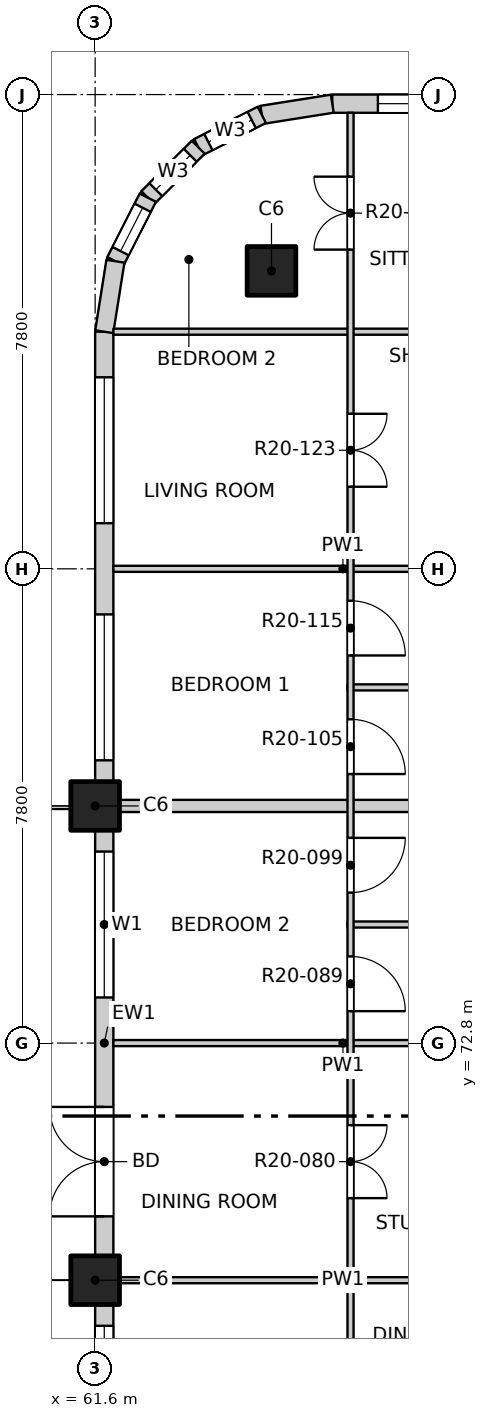
"""IFC4 building model, lengths in metres.
Left out: names, types, materials, properties, quantities, classifications, styles, units other than length and angle.
Written with IfcOpenShell. Run it as: python <this file> out.ifc"""

import sys

from ifc_helpers import new_model, si_unit, direction, frame, frame_2d, origin, origin_2d, place, context, subcontext, project, spatial, rectangle, extrude, element, fill, save


model = new_model("IFC4")
c1 = context("Model", 3, precision=1e-05, world=origin(), true_north=direction((0.0, 1.0)))
c2 = subcontext(c1, "Body", "Model", "MODEL_VIEW")
j1 = project(units=[si_unit("LENGTHUNIT", "METRE"), si_unit("PLANEANGLEUNIT", "RADIAN")], contexts=[c1])
p1 = place(None, origin())
s1 = spatial("IfcSite", under=j1, at=p1, CompositionType="ELEMENT")
p2 = place(p1, origin())
s2 = spatial("IfcBuilding", under=s1, at=p2, CompositionType="ELEMENT")
p3 = place(p2, frame((0.0, 0.0, 210.9)))
s3 = spatial("IfcBuildingStorey", under=s2, at=p3, CompositionType="ELEMENT", Elevation=210.9)
for number, where, z_axis, x_axis in (
    (1, (64.5, 85.5, -0.25), (0.0, 0.0, 1.0), (1.0, 0.0, 0.0)),
    (2, (61.6, 68.9, -0.25), (0.0, 0.0, 1.0), (1.0, 0.0, 0.0)),
    (3, (61.6, 76.7, -0.25), (0.0, 0.0, 1.0), (1.0, 0.0, 0.0)),
):
    element("IfcColumn", number, at=place(p3, frame(where, z_axis=z_axis, x_axis=x_axis)), inside=s3, PredefinedType="COLUMN", context=c2, shape_type="SweptSolid", body=[
        extrude(rectangle(XDim=0.8, YDim=0.8, at=origin_2d()), origin(), (0.0, 0.0, 1.0), 3.4),
    ])
p4 = place(p3, frame((65.5, 88.25, 0.0), z_axis=(0.0, 0.0, 1.0), x_axis=(1.0, 0.0, 0.0)))
e4 = element("IfcWall", 4, at=p4, inside=s3, PredefinedType="SOLIDWALL", context=c2, shape_type="SweptSolid", body=[
    extrude(rectangle(XDim=7.4, YDim=0.3, at=frame_2d((3.7, 0.0))), origin(), (0.0, 0.0, 1.0), 2.7),
])
p5 = place(p4, frame((0.75, 0.0, 0.9)))
e5 = element("IfcOpeningElement", 5, at=p5, cuts=e4, PredefinedType="OPENING", context=c2, shape_type="SweptSolid", body=[
    extrude(rectangle(XDim=2.4, YDim=1.8, at=frame_2d((1.2, 0.9))), frame((0.0, 0.16, 0.0), z_axis=(0.0, -1.0, 0.0), x_axis=(1.0, 0.0, 0.0)), (0.0, 0.0, 1.0), 0.32),
])
p6 = place(p4, frame((4.65, 0.0, 0.9)))
e6 = element("IfcOpeningElement", 6, at=p6, cuts=e4, PredefinedType="OPENING", context=c2, shape_type="SweptSolid", body=[
    extrude(rectangle(XDim=2.4, YDim=1.8, at=frame_2d((1.2, 0.9))), frame((0.0, 0.16, 0.0), z_axis=(0.0, -1.0, 0.0), x_axis=(1.0, 0.0, 0.0)), (0.0, 0.0, 1.0), 0.32),
])
p7 = place(p3, frame((61.75, 61.5, 0.0), z_axis=(0.0, 0.0, 1.0), x_axis=(0.0, 1.0, 0.0)))
e7 = element("IfcWall", 7, at=p7, inside=s3, PredefinedType="SOLIDWALL", context=c2, shape_type="SweptSolid", body=[
    extrude(rectangle(XDim=7.0, YDim=0.3, at=frame_2d((3.5, 0.0))), origin(), (0.0, 0.0, 1.0), 2.7),
])
p8 = place(p7, frame((0.65, 0.0, 0.0)))
e8 = element("IfcOpeningElement", 8, at=p8, cuts=e7, PredefinedType="OPENING", context=c2, shape_type="SweptSolid", body=[
    extrude(rectangle(XDim=1.8, YDim=2.4, at=frame_2d((0.9, 1.2))), frame((0.0, 0.16, 0.0), z_axis=(0.0, -1.0, 0.0), x_axis=(1.0, 0.0, 0.0)), (0.0, 0.0, 1.0), 0.32),
])
p9 = place(p7, frame((4.25, 0.0, 0.9)))
e9 = element("IfcOpeningElement", 9, at=p9, cuts=e7, PredefinedType="OPENING", context=c2, shape_type="SweptSolid", body=[
    extrude(rectangle(XDim=2.4, YDim=1.8, at=frame_2d((1.2, 0.9))), frame((0.0, 0.16, 0.0), z_axis=(0.0, -1.0, 0.0), x_axis=(1.0, 0.0, 0.0)), (0.0, 0.0, 1.0), 0.32),
])
p10 = place(p3, frame((61.75, 69.3, 0.0), z_axis=(0.0, 0.0, 1.0), x_axis=(0.0, 1.0, 0.0)))
e10 = element("IfcWall", 10, at=p10, inside=s3, PredefinedType="SOLIDWALL", context=c2, shape_type="SweptSolid", body=[
    extrude(rectangle(XDim=7.0, YDim=0.3, at=frame_2d((3.5, 0.0))), origin(), (0.0, 0.0, 1.0), 2.7),
])
p11 = place(p10, frame((0.65, 0.0, 0.0)))
e11 = element("IfcOpeningElement", 11, at=p11, cuts=e10, PredefinedType="OPENING", context=c2, shape_type="SweptSolid", body=[
    extrude(rectangle(XDim=1.8, YDim=2.4, at=frame_2d((0.9, 1.2))), frame((0.0, 0.16, 0.0), z_axis=(0.0, -1.0, 0.0), x_axis=(1.0, 0.0, 0.0)), (0.0, 0.0, 1.0), 0.32),
])
p12 = place(p10, frame((4.25, 0.0, 0.9)))
e12 = element("IfcOpeningElement", 12, at=p12, cuts=e10, PredefinedType="OPENING", context=c2, shape_type="SweptSolid", body=[
    extrude(rectangle(XDim=2.4, YDim=1.8, at=frame_2d((1.2, 0.9))), frame((0.0, 0.16, 0.0), z_axis=(0.0, -1.0, 0.0), x_axis=(1.0, 0.0, 0.0)), (0.0, 0.0, 1.0), 0.32),
])
p13 = place(p3, frame((61.75, 77.1, 0.0), z_axis=(0.0, 0.0, 1.0), x_axis=(0.0, 1.0, 0.0)))
e13 = element("IfcWall", 13, at=p13, inside=s3, PredefinedType="SOLIDWALL", context=c2, shape_type="SweptSolid", body=[
    extrude(rectangle(XDim=7.4, YDim=0.3, at=frame_2d((3.7, 0.0))), origin(), (0.0, 0.0, 1.0), 2.7),
])
p14 = place(p13, frame((0.35, 0.0, 0.9)))
e14 = element("IfcOpeningElement", 14, at=p14, cuts=e13, PredefinedType="OPENING", context=c2, shape_type="SweptSolid", body=[
    extrude(rectangle(XDim=2.4, YDim=1.8, at=frame_2d((1.2, 0.9))), frame((0.0, 0.16, 0.0), z_axis=(0.0, -1.0, 0.0), x_axis=(1.0, 0.0, 0.0)), (0.0, 0.0, 1.0), 0.32),
])
p15 = place(p13, frame((4.25, 0.0, 0.9)))
e15 = element("IfcOpeningElement", 15, at=p15, cuts=e13, PredefinedType="OPENING", context=c2, shape_type="SweptSolid", body=[
    extrude(rectangle(XDim=2.4, YDim=1.8, at=frame_2d((1.2, 0.9))), frame((0.0, 0.16, 0.0), z_axis=(0.0, -1.0, 0.0), x_axis=(1.0, 0.0, 0.0)), (0.0, 0.0, 1.0), 0.32),
])
p16 = place(p3, frame((65.5, 88.25, 0.0), z_axis=(0.0, 0.0, 1.0), x_axis=(-0.987678452879, -0.156496880861, 0.0)))
e16 = element("IfcWall", 16, at=p16, inside=s3, PredefinedType="SOLIDWALL", context=c2, shape_type="SweptSolid", body=[
    extrude(rectangle(XDim=1.173, YDim=0.3, at=frame_2d((0.586, 0.0))), origin(), (0.0, 0.0, 1.0), 2.7),
])
p17 = place(p3, frame((64.341, 88.066, 0.0), z_axis=(0.0, 0.0, 1.0), x_axis=(-0.890988677504, -0.454025524128, 0.0)))
e17 = element("IfcWall", 17, at=p17, inside=s3, PredefinedType="SOLIDWALL", context=c2, shape_type="SweptSolid", body=[
    extrude(rectangle(XDim=1.173, YDim=0.3, at=frame_2d((0.587, 0.0))), origin(), (0.0, 0.0, 1.0), 2.7),
])
p18 = place(p17, frame((0.187, 0.0, 0.9)))
e18 = element("IfcOpeningElement", 18, at=p18, cuts=e17, PredefinedType="OPENING", context=c2, shape_type="SweptSolid", body=[
    extrude(rectangle(XDim=0.8, YDim=1.2, at=frame_2d((0.4, 0.6))), frame((0.0, 0.16, 0.0), z_axis=(0.0, -1.0, 0.0), x_axis=(1.0, 0.0, 0.0)), (0.0, 0.0, 1.0), 0.32),
])
p19 = place(p3, frame((63.296, 87.534, 0.0), z_axis=(0.0, 0.0, 1.0), x_axis=(-0.707106781187, -0.707106781187, 0.0)))
e19 = element("IfcWall", 19, at=p19, inside=s3, PredefinedType="SOLIDWALL", context=c2, shape_type="SweptSolid", body=[
    extrude(rectangle(XDim=1.173, YDim=0.3, at=frame_2d((0.586, 0.0))), origin(), (0.0, 0.0, 1.0), 2.7),
])
p20 = place(p19, frame((0.187, 0.0, 0.9)))
e20 = element("IfcOpeningElement", 20, at=p20, cuts=e19, PredefinedType="OPENING", context=c2, shape_type="SweptSolid", body=[
    extrude(rectangle(XDim=0.8, YDim=1.2, at=frame_2d((0.4, 0.6))), frame((0.0, 0.16, 0.0), z_axis=(0.0, -1.0, 0.0), x_axis=(1.0, 0.0, 0.0)), (0.0, 0.0, 1.0), 0.32),
])
p21 = place(p3, frame((62.466, 86.704, 0.0), z_axis=(0.0, 0.0, 1.0), x_axis=(-0.454025524128, -0.890988677504, 0.0)))
e21 = element("IfcWall", 21, at=p21, inside=s3, PredefinedType="SOLIDWALL", context=c2, shape_type="SweptSolid", body=[
    extrude(rectangle(XDim=1.173, YDim=0.3, at=frame_2d((0.587, 0.0))), origin(), (0.0, 0.0, 1.0), 2.7),
])
p22 = place(p21, frame((0.187, 0.0, 0.9)))
e22 = element("IfcOpeningElement", 22, at=p22, cuts=e21, PredefinedType="OPENING", context=c2, shape_type="SweptSolid", body=[
    extrude(rectangle(XDim=0.8, YDim=1.2, at=frame_2d((0.4, 0.6))), frame((0.0, 0.16, 0.0), z_axis=(0.0, -1.0, 0.0), x_axis=(1.0, 0.0, 0.0)), (0.0, 0.0, 1.0), 0.32),
])
p23 = place(p3, frame((61.934, 85.659, 0.0), z_axis=(0.0, 0.0, 1.0), x_axis=(-0.156496880861, -0.987678452879, 0.0)))
e23 = element("IfcWall", 23, at=p23, inside=s3, PredefinedType="SOLIDWALL", context=c2, shape_type="SweptSolid", body=[
    extrude(rectangle(XDim=1.173, YDim=0.3, at=frame_2d((0.586, 0.0))), origin(), (0.0, 0.0, 1.0), 2.7),
])
p24 = place(p3, frame((61.9, 68.9, 0.0), z_axis=(0.0, 0.0, 1.0), x_axis=(1.0, 0.0, 0.0)))
e24 = element("IfcWall", 24, at=p24, inside=s3, PredefinedType="PARTITIONING", context=c2, shape_type="SweptSolid", body=[
    extrude(rectangle(XDim=7.55, YDim=0.1, at=frame_2d((3.775, 0.0))), origin(), (0.0, 0.0, 1.0), 2.55),
])
p25 = place(p3, frame((61.9, 72.8, 0.0), z_axis=(0.0, 0.0, 1.0), x_axis=(1.0, 0.0, 0.0)))
e25 = element("IfcWall", 25, at=p25, inside=s3, PredefinedType="PARTITIONING", context=c2, shape_type="SweptSolid", body=[
    extrude(rectangle(XDim=7.55, YDim=0.1, at=frame_2d((3.775, 0.0))), origin(), (0.0, 0.0, 1.0), 3.15),
])
p26 = place(p3, frame((65.75, 74.75, 0.0), z_axis=(0.0, 0.0, 1.0), x_axis=(1.0, 0.0, 0.0)))
e26 = element("IfcWall", 26, at=p26, inside=s3, PredefinedType="PARTITIONING", context=c2, shape_type="SweptSolid", body=[
    extrude(rectangle(XDim=3.7, YDim=0.1, at=frame_2d((1.85, 0.0))), origin(), (0.0, 0.0, 1.0), 3.15),
])
p27 = place(p3, frame((61.9, 76.7, 0.0), z_axis=(0.0, 0.0, 1.0), x_axis=(1.0, 0.0, 0.0)))
e27 = element("IfcWall", 27, at=p27, inside=s3, PredefinedType="PARTITIONING", context=c2, shape_type="SweptSolid", body=[
    extrude(rectangle(XDim=11.5, YDim=0.2, at=frame_2d((5.75, 0.0))), origin(), (0.0, 0.0, 1.0), 2.55),
])
p28 = place(p3, frame((65.75, 78.65, 0.0), z_axis=(0.0, 0.0, 1.0), x_axis=(1.0, 0.0, 0.0)))
e28 = element("IfcWall", 28, at=p28, inside=s3, PredefinedType="PARTITIONING", context=c2, shape_type="SweptSolid", body=[
    extrude(rectangle(XDim=3.7, YDim=0.1, at=frame_2d((1.85, 0.0))), origin(), (0.0, 0.0, 1.0), 3.15),
])
p29 = place(p3, frame((61.9, 80.6, 0.0), z_axis=(0.0, 0.0, 1.0), x_axis=(1.0, 0.0, 0.0)))
e29 = element("IfcWall", 29, at=p29, inside=s3, PredefinedType="PARTITIONING", context=c2, shape_type="SweptSolid", body=[
    extrude(rectangle(XDim=7.55, YDim=0.1, at=frame_2d((3.775, 0.0))), origin(), (0.0, 0.0, 1.0), 3.15),
])
p30 = place(p3, frame((61.9, 84.5, 0.0), z_axis=(0.0, 0.0, 1.0), x_axis=(1.0, 0.0, 0.0)))
e30 = element("IfcWall", 30, at=p30, inside=s3, PredefinedType="PARTITIONING", context=c2, shape_type="SweptSolid", body=[
    extrude(rectangle(XDim=11.5, YDim=0.1, at=frame_2d((5.75, 0.0))), origin(), (0.0, 0.0, 1.0), 3.15),
])
p31 = place(p30, frame((7.965, 0.0, 0.0)))
e31 = element("IfcOpeningElement", 31, at=p31, cuts=e30, PredefinedType="OPENING", context=c2, shape_type="SweptSolid", body=[
    extrude(rectangle(XDim=0.9, YDim=2.1, at=frame_2d((0.45, 1.05))), frame((0.0, 0.06, 0.0), z_axis=(0.0, -1.0, 0.0), x_axis=(1.0, 0.0, 0.0)), (0.0, 0.0, 1.0), 0.12),
])
p32 = place(p3, frame((65.8, 61.2, 0.0), z_axis=(0.0, 0.0, 1.0), x_axis=(0.0, 1.0, 0.0)))
e32 = element("IfcWall", 32, at=p32, inside=s3, PredefinedType="PARTITIONING", context=c2, shape_type="SweptSolid", body=[
    extrude(rectangle(XDim=26.9, YDim=0.1, at=frame_2d((13.45, 0.0))), origin(), (0.0, 0.0, 1.0), 3.15),
])
p33 = place(p32, frame((0.425, 0.0, 0.0)))
e33 = element("IfcOpeningElement", 33, at=p33, cuts=e32, PredefinedType="OPENING", context=c2, shape_type="SweptSolid", body=[
    extrude(rectangle(XDim=0.9, YDim=2.1, at=frame_2d((0.45, 1.05))), frame((0.0, 0.06, 0.0), z_axis=(0.0, -1.0, 0.0), x_axis=(1.0, 0.0, 0.0)), (0.0, 0.0, 1.0), 0.12),
])
p34 = place(p32, frame((2.375, 0.0, 0.0)))
e34 = element("IfcOpeningElement", 34, at=p34, cuts=e32, PredefinedType="OPENING", context=c2, shape_type="SweptSolid", body=[
    extrude(rectangle(XDim=0.9, YDim=2.1, at=frame_2d((0.45, 1.05))), frame((0.0, 0.06, 0.0), z_axis=(0.0, -1.0, 0.0), x_axis=(1.0, 0.0, 0.0)), (0.0, 0.0, 1.0), 0.12),
])
p35 = place(p32, frame((5.15, 0.0, 0.0)))
e35 = element("IfcOpeningElement", 35, at=p35, cuts=e32, PredefinedType="OPENING", context=c2, shape_type="SweptSolid", body=[
    extrude(rectangle(XDim=1.2, YDim=2.1, at=frame_2d((0.6, 1.05))), frame((0.0, 0.06, 0.0), z_axis=(0.0, -1.0, 0.0), x_axis=(1.0, 0.0, 0.0)), (0.0, 0.0, 1.0), 0.12),
])
p36 = place(p32, frame((9.05, 0.0, 0.0)))
e36 = element("IfcOpeningElement", 36, at=p36, cuts=e32, PredefinedType="OPENING", context=c2, shape_type="SweptSolid", body=[
    extrude(rectangle(XDim=1.2, YDim=2.1, at=frame_2d((0.6, 1.05))), frame((0.0, 0.06, 0.0), z_axis=(0.0, -1.0, 0.0), x_axis=(1.0, 0.0, 0.0)), (0.0, 0.0, 1.0), 0.12),
])
p37 = place(p32, frame((12.125, 0.0, 0.0)))
e37 = element("IfcOpeningElement", 37, at=p37, cuts=e32, PredefinedType="OPENING", context=c2, shape_type="SweptSolid", body=[
    extrude(rectangle(XDim=0.9, YDim=2.1, at=frame_2d((0.45, 1.05))), frame((0.0, 0.06, 0.0), z_axis=(0.0, -1.0, 0.0), x_axis=(1.0, 0.0, 0.0)), (0.0, 0.0, 1.0), 0.12),
])
p38 = place(p32, frame((14.075, 0.0, 0.0)))
e38 = element("IfcOpeningElement", 38, at=p38, cuts=e32, PredefinedType="OPENING", context=c2, shape_type="SweptSolid", body=[
    extrude(rectangle(XDim=0.9, YDim=2.1, at=frame_2d((0.45, 1.05))), frame((0.0, 0.06, 0.0), z_axis=(0.0, -1.0, 0.0), x_axis=(1.0, 0.0, 0.0)), (0.0, 0.0, 1.0), 0.12),
])
p39 = place(p32, frame((16.025, 0.0, 0.0)))
e39 = element("IfcOpeningElement", 39, at=p39, cuts=e32, PredefinedType="OPENING", context=c2, shape_type="SweptSolid", body=[
    extrude(rectangle(XDim=0.9, YDim=2.1, at=frame_2d((0.45, 1.05))), frame((0.0, 0.06, 0.0), z_axis=(0.0, -1.0, 0.0), x_axis=(1.0, 0.0, 0.0)), (0.0, 0.0, 1.0), 0.12),
])
p40 = place(p32, frame((17.975, 0.0, 0.0)))
e40 = element("IfcOpeningElement", 40, at=p40, cuts=e32, PredefinedType="OPENING", context=c2, shape_type="SweptSolid", body=[
    extrude(rectangle(XDim=0.9, YDim=2.1, at=frame_2d((0.45, 1.05))), frame((0.0, 0.06, 0.0), z_axis=(0.0, -1.0, 0.0), x_axis=(1.0, 0.0, 0.0)), (0.0, 0.0, 1.0), 0.12),
])
p41 = place(p32, frame((20.75, 0.0, 0.0)))
e41 = element("IfcOpeningElement", 41, at=p41, cuts=e32, PredefinedType="OPENING", context=c2, shape_type="SweptSolid", body=[
    extrude(rectangle(XDim=1.2, YDim=2.1, at=frame_2d((0.6, 1.05))), frame((0.0, 0.06, 0.0), z_axis=(0.0, -1.0, 0.0), x_axis=(1.0, 0.0, 0.0)), (0.0, 0.0, 1.0), 0.12),
])
p42 = place(p32, frame((24.65, 0.0, 0.0)))
e42 = element("IfcOpeningElement", 42, at=p42, cuts=e32, PredefinedType="OPENING", context=c2, shape_type="SweptSolid", body=[
    extrude(rectangle(XDim=1.2, YDim=2.1, at=frame_2d((0.6, 1.05))), frame((0.0, 0.06, 0.0), z_axis=(0.0, -1.0, 0.0), x_axis=(1.0, 0.0, 0.0)), (0.0, 0.0, 1.0), 0.12),
])
p43 = place(p5, origin())
e43 = element("IfcWindow", 43, at=p43, inside=s3, PartitioningType="DOUBLE_PANEL_VERTICAL", PredefinedType="WINDOW", context=c2, shape_type="SweptSolid", body=[
    extrude(rectangle(XDim=2.4, YDim=1.8, at=frame_2d((1.2, 0.9))), frame((0.0, 0.03, 0.0), z_axis=(0.0, -1.0, 0.0), x_axis=(1.0, 0.0, 0.0)), (0.0, 0.0, 1.0), 0.06),
])
fill(e5, e43)
p44 = place(p9, origin())
e44 = element("IfcWindow", 44, at=p44, inside=s3, PartitioningType="DOUBLE_PANEL_VERTICAL", PredefinedType="WINDOW", context=c2, shape_type="SweptSolid", body=[
    extrude(rectangle(XDim=2.4, YDim=1.8, at=frame_2d((1.2, 0.9))), frame((0.0, 0.03, 0.0), z_axis=(0.0, -1.0, 0.0), x_axis=(1.0, 0.0, 0.0)), (0.0, 0.0, 1.0), 0.06),
])
fill(e9, e44)
p45 = place(p11, origin())
e45 = element("IfcDoor", 45, at=p45, inside=s3, OperationType="DOUBLE_DOOR_SINGLE_SWING", PredefinedType="DOOR", context=c2, shape_type="SweptSolid", body=[
    extrude(rectangle(XDim=1.8, YDim=2.4, at=frame_2d((0.9, 1.2))), frame((0.0, 0.025, 0.0), z_axis=(0.0, -1.0, 0.0), x_axis=(1.0, 0.0, 0.0)), (0.0, 0.0, 1.0), 0.05),
])
fill(e11, e45)
p46 = place(p12, origin())
e46 = element("IfcWindow", 46, at=p46, inside=s3, PartitioningType="DOUBLE_PANEL_VERTICAL", PredefinedType="WINDOW", context=c2, shape_type="SweptSolid", body=[
    extrude(rectangle(XDim=2.4, YDim=1.8, at=frame_2d((1.2, 0.9))), frame((0.0, 0.03, 0.0), z_axis=(0.0, -1.0, 0.0), x_axis=(1.0, 0.0, 0.0)), (0.0, 0.0, 1.0), 0.06),
])
fill(e12, e46)
p47 = place(p14, origin())
e47 = element("IfcWindow", 47, at=p47, inside=s3, PartitioningType="DOUBLE_PANEL_VERTICAL", PredefinedType="WINDOW", context=c2, shape_type="SweptSolid", body=[
    extrude(rectangle(XDim=2.4, YDim=1.8, at=frame_2d((1.2, 0.9))), frame((0.0, 0.03, 0.0), z_axis=(0.0, -1.0, 0.0), x_axis=(1.0, 0.0, 0.0)), (0.0, 0.0, 1.0), 0.06),
])
fill(e14, e47)
p48 = place(p15, origin())
e48 = element("IfcWindow", 48, at=p48, inside=s3, PartitioningType="DOUBLE_PANEL_VERTICAL", PredefinedType="WINDOW", context=c2, shape_type="SweptSolid", body=[
    extrude(rectangle(XDim=2.4, YDim=1.8, at=frame_2d((1.2, 0.9))), frame((0.0, 0.03, 0.0), z_axis=(0.0, -1.0, 0.0), x_axis=(1.0, 0.0, 0.0)), (0.0, 0.0, 1.0), 0.06),
])
fill(e15, e48)
p49 = place(p18, origin())
e49 = element("IfcWindow", 49, at=p49, inside=s3, PartitioningType="SINGLE_PANEL", PredefinedType="WINDOW", context=c2, shape_type="SweptSolid", body=[
    extrude(rectangle(XDim=0.8, YDim=1.2, at=frame_2d((0.4, 0.6))), frame((0.0, 0.03, 0.0), z_axis=(0.0, -1.0, 0.0), x_axis=(1.0, 0.0, 0.0)), (0.0, 0.0, 1.0), 0.06),
])
fill(e18, e49)
p50 = place(p20, origin())
e50 = element("IfcWindow", 50, at=p50, inside=s3, PartitioningType="SINGLE_PANEL", PredefinedType="WINDOW", context=c2, shape_type="SweptSolid", body=[
    extrude(rectangle(XDim=0.8, YDim=1.2, at=frame_2d((0.4, 0.6))), frame((0.0, 0.03, 0.0), z_axis=(0.0, -1.0, 0.0), x_axis=(1.0, 0.0, 0.0)), (0.0, 0.0, 1.0), 0.06),
])
fill(e20, e50)
p51 = place(p22, origin())
e51 = element("IfcWindow", 51, at=p51, inside=s3, PartitioningType="SINGLE_PANEL", PredefinedType="WINDOW", context=c2, shape_type="SweptSolid", body=[
    extrude(rectangle(XDim=0.8, YDim=1.2, at=frame_2d((0.4, 0.6))), frame((0.0, 0.03, 0.0), z_axis=(0.0, -1.0, 0.0), x_axis=(1.0, 0.0, 0.0)), (0.0, 0.0, 1.0), 0.06),
])
fill(e22, e51)
p52 = place(p36, origin())
e52 = element("IfcDoor", 52, at=p52, inside=s3, OperationType="DOUBLE_DOOR_SINGLE_SWING", PredefinedType="DOOR", context=c2, shape_type="SweptSolid", body=[
    extrude(rectangle(XDim=1.2, YDim=2.1, at=frame_2d((0.6, 1.05))), frame((0.0, 0.025, 0.0), z_axis=(0.0, -1.0, 0.0), x_axis=(1.0, 0.0, 0.0)), (0.0, 0.0, 1.0), 0.05),
])
fill(e36, e52)
p53 = place(p37, origin())
e53 = element("IfcDoor", 53, at=p53, inside=s3, OperationType="SINGLE_SWING_RIGHT", PredefinedType="DOOR", context=c2, shape_type="SweptSolid", body=[
    extrude(rectangle(XDim=0.9, YDim=2.1, at=frame_2d((0.45, 1.05))), frame((0.0, 0.025, 0.0), z_axis=(0.0, -1.0, 0.0), x_axis=(1.0, 0.0, 0.0)), (0.0, 0.0, 1.0), 0.05),
])
fill(e37, e53)
p54 = place(p38, origin())
e54 = element("IfcDoor", 54, at=p54, inside=s3, OperationType="SINGLE_SWING_LEFT", PredefinedType="DOOR", context=c2, shape_type="SweptSolid", body=[
    extrude(rectangle(XDim=0.9, YDim=2.1, at=frame_2d((0.45, 1.05))), frame((0.0, 0.025, 0.0), z_axis=(0.0, -1.0, 0.0), x_axis=(1.0, 0.0, 0.0)), (0.0, 0.0, 1.0), 0.05),
])
fill(e38, e54)
p55 = place(p39, origin())
e55 = element("IfcDoor", 55, at=p55, inside=s3, OperationType="SINGLE_SWING_RIGHT", PredefinedType="DOOR", context=c2, shape_type="SweptSolid", body=[
    extrude(rectangle(XDim=0.9, YDim=2.1, at=frame_2d((0.45, 1.05))), frame((0.0, 0.025, 0.0), z_axis=(0.0, -1.0, 0.0), x_axis=(1.0, 0.0, 0.0)), (0.0, 0.0, 1.0), 0.05),
])
fill(e39, e55)
p56 = place(p40, origin())
e56 = element("IfcDoor", 56, at=p56, inside=s3, OperationType="SINGLE_SWING_RIGHT", PredefinedType="DOOR", context=c2, shape_type="SweptSolid", body=[
    extrude(rectangle(XDim=0.9, YDim=2.1, at=frame_2d((0.45, 1.05))), frame((0.0, 0.025, 0.0), z_axis=(0.0, -1.0, 0.0), x_axis=(1.0, 0.0, 0.0)), (0.0, 0.0, 1.0), 0.05),
])
fill(e40, e56)
p57 = place(p41, origin())
e57 = element("IfcDoor", 57, at=p57, inside=s3, OperationType="DOUBLE_DOOR_SINGLE_SWING", PredefinedType="DOOR", context=c2, shape_type="SweptSolid", body=[
    extrude(rectangle(XDim=1.2, YDim=2.1, at=frame_2d((0.6, 1.05))), frame((0.0, 0.025, 0.0), z_axis=(0.0, -1.0, 0.0), x_axis=(1.0, 0.0, 0.0)), (0.0, 0.0, 1.0), 0.05),
])
fill(e41, e57)
p58 = place(p42, origin())
e58 = element("IfcDoor", 58, at=p58, inside=s3, OperationType="DOUBLE_DOOR_SINGLE_SWING", PredefinedType="DOOR", context=c2, shape_type="SweptSolid", body=[
    extrude(rectangle(XDim=1.2, YDim=2.1, at=frame_2d((0.6, 1.05))), frame((0.0, 0.025, 0.0), z_axis=(0.0, -1.0, 0.0), x_axis=(1.0, 0.0, 0.0)), (0.0, 0.0, 1.0), 0.05),
])
fill(e42, e58)
save(model, sys.argv[1])
